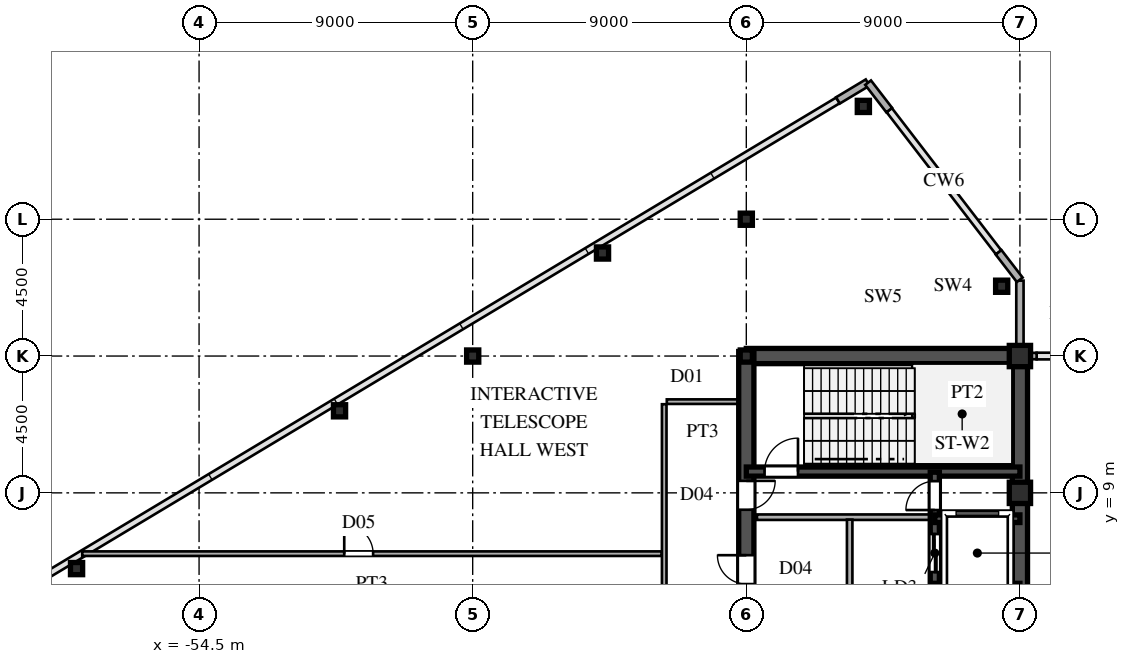
"""IFC4 building model, lengths in metres.
Left out: names, types, materials, properties, quantities, classifications, styles, units other than length and angle.
Written with IfcOpenShell. Run it as: python <this file> out.ifc"""

import sys

from ifc_helpers import new_model, si_unit, direction, frame, frame_2d, origin, origin_2d, place, context, subcontext, project, spatial, rectangle, hollow_rectangle, i_section, extrude, source, transform, mapped, element, fill, save


model = new_model("IFC4")
c1 = context("Model", 3, precision=1e-05, world=origin(), true_north=direction((0.0, 1.0)))
c2 = subcontext(c1, "Body", "Model", "MODEL_VIEW")
j1 = project(units=[si_unit("LENGTHUNIT", "METRE"), si_unit("PLANEANGLEUNIT", "RADIAN")], contexts=[c1])
p1 = place(None, origin())
s1 = spatial("IfcSite", under=j1, at=p1, CompositionType="ELEMENT")
p2 = place(p1, origin())
s2 = spatial("IfcBuilding", under=s1, at=p2, CompositionType="ELEMENT")
p3 = place(p2, frame((0.0, 0.0, 269.4)))
s3 = spatial("IfcBuildingStorey", under=s2, at=p3, CompositionType="ELEMENT", Elevation=269.4)
m1 = source(origin(), c2, "Body", "SweptSolid", [
    extrude(hollow_rectangle(XDim=0.7, YDim=0.7, WallThickness=0.03, at=origin_2d()), origin(), (0.0, 0.0, 1.0), 4.8),
])
for number, where, z_axis, x_axis in (
    (1, (-27.5, 9.0, 0.0), (0.0, 0.0, 1.0), (1.0, 0.0, 0.0)),
    (2, (-27.5, 13.5, 0.0), (0.0, 0.0, 1.0), (1.0, 0.0, 0.0)),
):
    element("IfcColumn", number, at=place(p3, frame(where, z_axis=z_axis, x_axis=x_axis)), inside=s3, PredefinedType="COLUMN", context=c2, shape_type="MappedRepresentation", body=[
        mapped(m1, transform((0.0, 0.0, 0.0), scale=1.0)),
    ])
m2 = source(origin(), c2, "Body", "SweptSolid", [
    extrude(i_section(OverallWidth=0.4, OverallDepth=0.4, WebThickness=0.013, FlangeThickness=0.021, at=origin_2d()), origin(), (0.0, 0.0, 1.0), 4.8),
])
for number, where, z_axis, x_axis in (
    (3, (-36.5, 13.5, 0.0), (0.0, 0.0, 1.0), (1.0, 0.0, 0.0)),
    (4, (-36.5, 18.0, 0.0), (0.0, 0.0, 1.0), (1.0, 0.0, 0.0)),
    (5, (-45.5, 13.5, 0.0), (0.0, 0.0, 1.0), (1.0, 0.0, 0.0)),
):
    element("IfcColumn", number, at=place(p3, frame(where, z_axis=z_axis, x_axis=x_axis)), inside=s3, PredefinedType="COLUMN", context=c2, shape_type="MappedRepresentation", body=[
        mapped(m2, transform((0.0, 0.0, 0.0), scale=1.0)),
    ])
m3 = source(origin(), c2, "Body", "SweptSolid", [
    extrude(hollow_rectangle(XDim=0.4, YDim=0.4, WallThickness=0.016, at=origin_2d()), origin(), (0.0, 0.0, 1.0), 4.8),
])
for number, where, z_axis, x_axis in (
    (6, (-28.1, 15.796, 0.0), (0.0, 0.0, 1.0), (1.0, 0.0, 0.0)),
    (7, (-32.65, 21.71, 0.0), (0.0, 0.0, 1.0), (1.0, 0.0, 0.0)),
    (8, (-41.23, 16.889, 0.0), (0.0, 0.0, 1.0), (1.0, 0.0, 0.0)),
    (9, (-49.88, 11.699, 0.0), (0.0, 0.0, 1.0), (1.0, 0.0, 0.0)),
    (10, (-58.53, 6.509, 0.0), (0.0, 0.0, 1.0), (1.0, 0.0, 0.0)),
):
    element("IfcColumn", number, at=place(p3, frame(where, z_axis=z_axis, x_axis=x_axis)), inside=s3, PredefinedType="COLUMN", context=c2, shape_type="MappedRepresentation", body=[
        mapped(m3, transform((0.0, 0.0, 0.0), scale=1.0)),
    ])
p4 = place(p3, frame((-27.5, 13.755, 0.0), z_axis=(0.0, 0.0, 1.0), x_axis=(0.0, 1.0, 0.0)))
e11 = element("IfcWall", 11, at=p4, inside=s3, PredefinedType="SOLIDWALL", context=c2, shape_type="SweptSolid", body=[
    extrude(rectangle(XDim=0.62, YDim=0.24, at=frame_2d((0.31, 0.0))), origin(), (0.0, 0.0, 1.0), 4.04),
])
p5 = place(p3, frame((-27.5, 14.375, 0.0), z_axis=(0.0, 0.0, 1.0), x_axis=(0.0, 1.0, 0.0)))
e12 = element("IfcWall", 12, at=p5, inside=s3, PredefinedType="SOLIDWALL", context=c2, shape_type="SweptSolid", body=[
    extrude(rectangle(XDim=1.605, YDim=0.24, at=frame_2d((0.803, 0.0))), origin(), (0.0, 0.0, 1.0), 4.54),
])
for number, where, z_axis, x_axis in (
    (13, (-27.506, 16.008, 0.0), (0.0, 0.0, 1.0), (-0.61, 0.793, 0.0)),
    (14, (-31.799, 21.588, 0.0), (0.0, 0.0, 1.0), (-0.61, 0.793, 0.0)),
    (15, (-32.509, 22.495, 0.0), (0.0, 0.0, 1.0), (-0.857, -0.515, 0.0)),
):
    element("IfcWall", number, at=place(p3, frame(where, z_axis=z_axis, x_axis=x_axis)), inside=s3, PredefinedType="SOLIDWALL", context=c2, shape_type="SweptSolid", body=[
        extrude(rectangle(XDim=1.14, YDim=0.24, at=frame_2d((0.57, 0.0))), origin(), (0.0, 0.0, 1.0), 4.54),
    ])
p6 = place(p3, frame((-27.49, 13.5, 0.0), z_axis=(0.0, 0.0, 1.0), x_axis=(1.0, 0.0, 0.0)))
e16 = element("IfcWall", 16, at=p6, inside=s3, PredefinedType="SOLIDWALL", context=c2, shape_type="SweptSolid", body=[
    extrude(rectangle(XDim=0.54, YDim=0.21, at=frame_2d((0.27, 0.0))), origin(), (0.0, 0.0, 1.0), 4.04),
])
p7 = place(p3, frame((-27.5, 1.3, 0.0), z_axis=(0.0, 0.0, 1.0), x_axis=(0.0, 1.0, 0.0)))
e17 = element("IfcWall", 17, at=p7, inside=s3, PredefinedType="SHEAR", context=c2, shape_type="SweptSolid", body=[
    extrude(rectangle(XDim=12.2, YDim=0.5, at=frame_2d((6.1, 0.0))), origin(), (0.0, 0.0, 1.0), 4.54),
])
p8 = place(p3, frame((-36.5, 13.5, 0.0), z_axis=(0.0, 0.0, 1.0), x_axis=(1.0, 0.0, 0.0)))
e18 = element("IfcWall", 18, at=p8, inside=s3, PredefinedType="SHEAR", context=c2, shape_type="SweptSolid", body=[
    extrude(rectangle(XDim=9.0, YDim=0.5, at=frame_2d((4.5, 0.0))), origin(), (0.0, 0.0, 1.0), 4.54),
])
p9 = place(p3, frame((-36.5, 8.2, 0.0), z_axis=(0.0, 0.0, 1.0), x_axis=(0.0, 1.0, 0.0)))
e19 = element("IfcWall", 19, at=p9, inside=s3, PredefinedType="SHEAR", context=c2, shape_type="SweptSolid", body=[
    extrude(rectangle(XDim=5.45, YDim=0.5, at=frame_2d((2.725, 0.0))), origin(), (0.0, 0.0, 1.0), 4.54),
])
p10 = place(p9, frame((0.245, 0.0, 0.0)))
e20 = element("IfcOpeningElement", 20, at=p10, cuts=e19, PredefinedType="OPENING", context=c2, shape_type="SweptSolid", body=[
    extrude(rectangle(XDim=0.95, YDim=2.15, at=frame_2d((0.475, 1.075))), frame((0.0, 0.26, 0.0), z_axis=(0.0, -1.0, 0.0), x_axis=(1.0, 0.0, 0.0)), (0.0, 0.0, 1.0), 0.52),
])
p11 = place(p3, frame((-36.5, 4.75, 0.0), z_axis=(0.0, 0.0, 1.0), x_axis=(0.0, 1.0, 0.0)))
e21 = element("IfcWall", 21, at=p11, inside=s3, PredefinedType="SHEAR", context=c2, shape_type="SweptSolid", body=[
    extrude(rectangle(XDim=3.45, YDim=0.5, at=frame_2d((1.725, 0.0))), origin(), (0.0, 0.0, 1.0), 4.54),
])
p12 = place(p11, frame((1.25, 0.0, 0.0)))
e22 = element("IfcOpeningElement", 22, at=p12, cuts=e21, PredefinedType="OPENING", context=c2, shape_type="SweptSolid", body=[
    extrude(rectangle(XDim=0.95, YDim=2.15, at=frame_2d((0.475, 1.075))), frame((0.0, 0.26, 0.0), z_axis=(0.0, -1.0, 0.0), x_axis=(1.0, 0.0, 0.0)), (0.0, 0.0, 1.0), 0.52),
])
p13 = place(p3, frame((-36.5, 9.7, 0.0), z_axis=(0.0, 0.0, 1.0), x_axis=(1.0, 0.0, 0.0)))
e23 = element("IfcWall", 23, at=p13, inside=s3, PredefinedType="SHEAR", context=c2, shape_type="SweptSolid", body=[
    extrude(rectangle(XDim=9.0, YDim=0.3, at=frame_2d((4.5, 0.0))), origin(), (0.0, 0.0, 1.0), 4.54),
])
p14 = place(p13, frame((0.6, 0.0, 0.0)))
e24 = element("IfcOpeningElement", 24, at=p14, cuts=e23, PredefinedType="OPENING", context=c2, shape_type="SweptSolid", body=[
    extrude(rectangle(XDim=1.1, YDim=2.2, at=frame_2d((0.55, 1.1))), frame((0.0, 0.16, 0.0), z_axis=(0.0, -1.0, 0.0), x_axis=(1.0, 0.0, 0.0)), (0.0, 0.0, 1.0), 0.32),
])
for number, where, z_axis, x_axis in (
    (25, (-30.3, 5.9, 0.0), (0.0, 0.0, 1.0), (1.0, 0.0, 0.0)),
    (26, (-30.3, 8.15, 0.0), (0.0, 0.0, 1.0), (1.0, 0.0, 0.0)),
):
    element("IfcWall", number, at=place(p3, frame(where, z_axis=z_axis, x_axis=x_axis)), inside=s3, PredefinedType="SHEAR", context=c2, shape_type="SweptSolid", body=[
        extrude(rectangle(XDim=2.8, YDim=0.25, at=frame_2d((1.4, 0.0))), origin(), (0.0, 0.0, 1.0), 4.54),
    ])
p15 = place(p3, frame((-30.3, 5.9, 0.0), z_axis=(0.0, 0.0, 1.0), x_axis=(0.0, 1.0, 0.0)))
e27 = element("IfcWall", 27, at=p15, inside=s3, PredefinedType="SHEAR", context=c2, shape_type="SweptSolid", body=[
    extrude(rectangle(XDim=2.25, YDim=0.3, at=frame_2d((1.125, 0.0))), origin(), (0.0, 0.0, 1.0), 4.54),
])
p16 = place(p15, frame((0.495, 0.0, 0.0)))
e28 = element("IfcOpeningElement", 28, at=p16, cuts=e27, PredefinedType="OPENING", context=c2, shape_type="SweptSolid", body=[
    extrude(rectangle(XDim=1.25, YDim=2.3, at=frame_2d((0.625, 1.15))), frame((0.0, 0.16, 0.0), z_axis=(0.0, -1.0, 0.0), x_axis=(1.0, 0.0, 0.0)), (0.0, 0.0, 1.0), 0.32),
])
p17 = place(p3, frame((-30.3, 8.15, 0.0), z_axis=(0.0, 0.0, 1.0), x_axis=(0.0, 1.0, 0.0)))
e29 = element("IfcWall", 29, at=p17, inside=s3, PredefinedType="SHEAR", context=c2, shape_type="SweptSolid", body=[
    extrude(rectangle(XDim=1.53, YDim=0.3, at=frame_2d((0.765, 0.0))), origin(), (0.0, 0.0, 1.0), 4.54),
])
p18 = place(p17, frame((0.285, 0.0, 0.0)))
e30 = element("IfcOpeningElement", 30, at=p18, cuts=e29, PredefinedType="OPENING", context=c2, shape_type="SweptSolid", body=[
    extrude(rectangle(XDim=0.95, YDim=2.15, at=frame_2d((0.475, 1.075))), frame((0.0, 0.16, 0.0), z_axis=(0.0, -1.0, 0.0), x_axis=(1.0, 0.0, 0.0)), (0.0, 0.0, 1.0), 0.32),
])
p19 = place(p3, frame((-36.15, 8.2, 0.0), z_axis=(0.0, 0.0, 1.0), x_axis=(1.0, 0.0, 0.0)))
e31 = element("IfcWall", 31, at=p19, inside=s3, PredefinedType="PARTITIONING", context=c2, shape_type="SweptSolid", body=[
    extrude(rectangle(XDim=5.7, YDim=0.18, at=frame_2d((2.85, 0.0))), origin(), (0.0, 0.0, 1.0), 4.54),
])
p20 = place(p3, frame((-33.1, 1.38, 0.0), z_axis=(0.0, 0.0, 1.0), x_axis=(0.0, 1.0, 0.0)))
e32 = element("IfcWall", 32, at=p20, inside=s3, PredefinedType="PARTITIONING", context=c2, shape_type="SweptSolid", body=[
    extrude(rectangle(XDim=6.74, YDim=0.18, at=frame_2d((3.37, 0.0))), origin(), (0.0, 0.0, 1.0), 4.54),
])
p21 = place(p3, frame((-58.343, 7.0, 0.0), z_axis=(0.0, 0.0, 1.0), x_axis=(1.0, 0.0, 0.0)))
e33 = element("IfcWall", 33, at=p21, inside=s3, PredefinedType="PARTITIONING", context=c2, shape_type="SweptSolid", body=[
    extrude(rectangle(XDim=19.058, YDim=0.15, at=frame_2d((9.529, 0.0))), origin(), (0.0, 0.0, 1.0), 4.54),
])
p22 = place(p21, frame((8.618, 0.0, 0.0)))
e34 = element("IfcOpeningElement", 34, at=p22, cuts=e33, PredefinedType="OPENING", context=c2, shape_type="SweptSolid", body=[
    extrude(rectangle(XDim=0.95, YDim=2.15, at=frame_2d((0.475, 1.075))), frame((0.0, 0.085, 0.0), z_axis=(0.0, -1.0, 0.0), x_axis=(1.0, 0.0, 0.0)), (0.0, 0.0, 1.0), 0.17),
])
p23 = place(p3, frame((-39.115, 12.0, 0.0), z_axis=(0.0, 0.0, 1.0), x_axis=(1.0, 0.0, 0.0)))
e35 = element("IfcWall", 35, at=p23, inside=s3, PredefinedType="PARTITIONING", context=c2, shape_type="SweptSolid", body=[
    extrude(rectangle(XDim=2.36, YDim=0.15, at=frame_2d((1.18, 0.0))), origin(), (0.0, 0.0, 1.0), 4.54),
])
p24 = place(p3, frame((-39.2, -11.915, 0.0), z_axis=(0.0, 0.0, 1.0), x_axis=(0.0, 1.0, 0.0)))
e36 = element("IfcWall", 36, at=p24, inside=s3, PredefinedType="PARTITIONING", context=c2, shape_type="SweptSolid", body=[
    extrude(rectangle(XDim=23.83, YDim=0.15, at=frame_2d((11.915, 0.0))), origin(), (0.0, 0.0, 1.0), 4.54),
])
p25 = place(p24, frame((11.44, 0.0, 0.0)))
e37 = element("IfcOpeningElement", 37, at=p25, cuts=e36, PredefinedType="OPENING", context=c2, shape_type="SweptSolid", body=[
    extrude(rectangle(XDim=0.95, YDim=2.15, at=frame_2d((0.475, 1.075))), frame((0.0, 0.085, 0.0), z_axis=(0.0, -1.0, 0.0), x_axis=(1.0, 0.0, 0.0)), (0.0, 0.0, 1.0), 0.17),
])
m4 = source(origin(), c2, "Body", "SweptSolid", [
    extrude(rectangle(XDim=0.95, YDim=2.15, at=frame_2d((0.475, 1.075))), frame((0.0, 0.025, 0.0), z_axis=(0.0, -1.0, 0.0), x_axis=(1.0, 0.0, 0.0)), (0.0, 0.0, 1.0), 0.05),
])
p26 = place(p10, frame((0.95, 0.0, 0.0), z_axis=(0.0, 0.0, 1.0), x_axis=(-1.0, 0.0, 0.0)))
e38 = element("IfcDoor", 38, at=p26, inside=s3, OperationType="SINGLE_SWING_RIGHT", PredefinedType="DOOR", context=c2, shape_type="MappedRepresentation", body=[
    mapped(m4, transform((0.0, 0.0, 0.0), scale=1.0)),
])
fill(e20, e38)
p27 = place(p12, origin())
e39 = element("IfcDoor", 39, at=p27, inside=s3, OperationType="SINGLE_SWING_RIGHT", PredefinedType="DOOR", context=c2, shape_type="MappedRepresentation", body=[
    mapped(m4, transform((0.0, 0.0, 0.0), scale=1.0)),
])
fill(e22, e39)
m5 = source(origin(), c2, "Body", "SweptSolid", [
    extrude(rectangle(XDim=1.1, YDim=2.2, at=frame_2d((0.55, 1.1))), frame((0.0, 0.025, 0.0), z_axis=(0.0, -1.0, 0.0), x_axis=(1.0, 0.0, 0.0)), (0.0, 0.0, 1.0), 0.05),
])
p28 = place(p14, origin())
e40 = element("IfcDoor", 40, at=p28, inside=s3, OperationType="SINGLE_SWING_RIGHT", PredefinedType="DOOR", context=c2, shape_type="MappedRepresentation", body=[
    mapped(m5, transform((0.0, 0.0, 0.0), scale=1.0)),
])
fill(e24, e40)
m6 = source(origin(), c2, "Body", "SweptSolid", [
    extrude(rectangle(XDim=1.25, YDim=2.3, at=frame_2d((0.625, 1.15))), frame((0.0, 0.025, 0.0), z_axis=(0.0, -1.0, 0.0), x_axis=(1.0, 0.0, 0.0)), (0.0, 0.0, 1.0), 0.05),
])
p29 = place(p16, origin())
e41 = element("IfcDoor", 41, at=p29, inside=s3, OperationType="DOUBLE_DOOR_SLIDING", PredefinedType="DOOR", context=c2, shape_type="MappedRepresentation", body=[
    mapped(m6, transform((0.0, 0.0, 0.0), scale=1.0)),
])
fill(e28, e41)
p30 = place(p18, origin())
e42 = element("IfcDoor", 42, at=p30, inside=s3, OperationType="SINGLE_SWING_LEFT", PredefinedType="DOOR", context=c2, shape_type="MappedRepresentation", body=[
    mapped(m4, transform((0.0, 0.0, 0.0), scale=1.0)),
])
fill(e30, e42)
m7 = source(origin(), c2, "Body", "SweptSolid", [
    extrude(rectangle(XDim=0.95, YDim=2.15, at=frame_2d((0.475, 1.075))), frame((0.0, 0.025, 0.0), z_axis=(0.0, -1.0, 0.0), x_axis=(1.0, 0.0, 0.0)), (0.0, 0.0, 1.0), 0.05),
])
p31 = place(p22, origin())
e43 = element("IfcDoor", 43, at=p31, inside=s3, OperationType="SINGLE_SWING_LEFT", PredefinedType="DOOR", context=c2, shape_type="MappedRepresentation", body=[
    mapped(m7, transform((0.0, 0.0, 0.0), scale=1.0)),
])
fill(e34, e43)
save(model, sys.argv[1])
